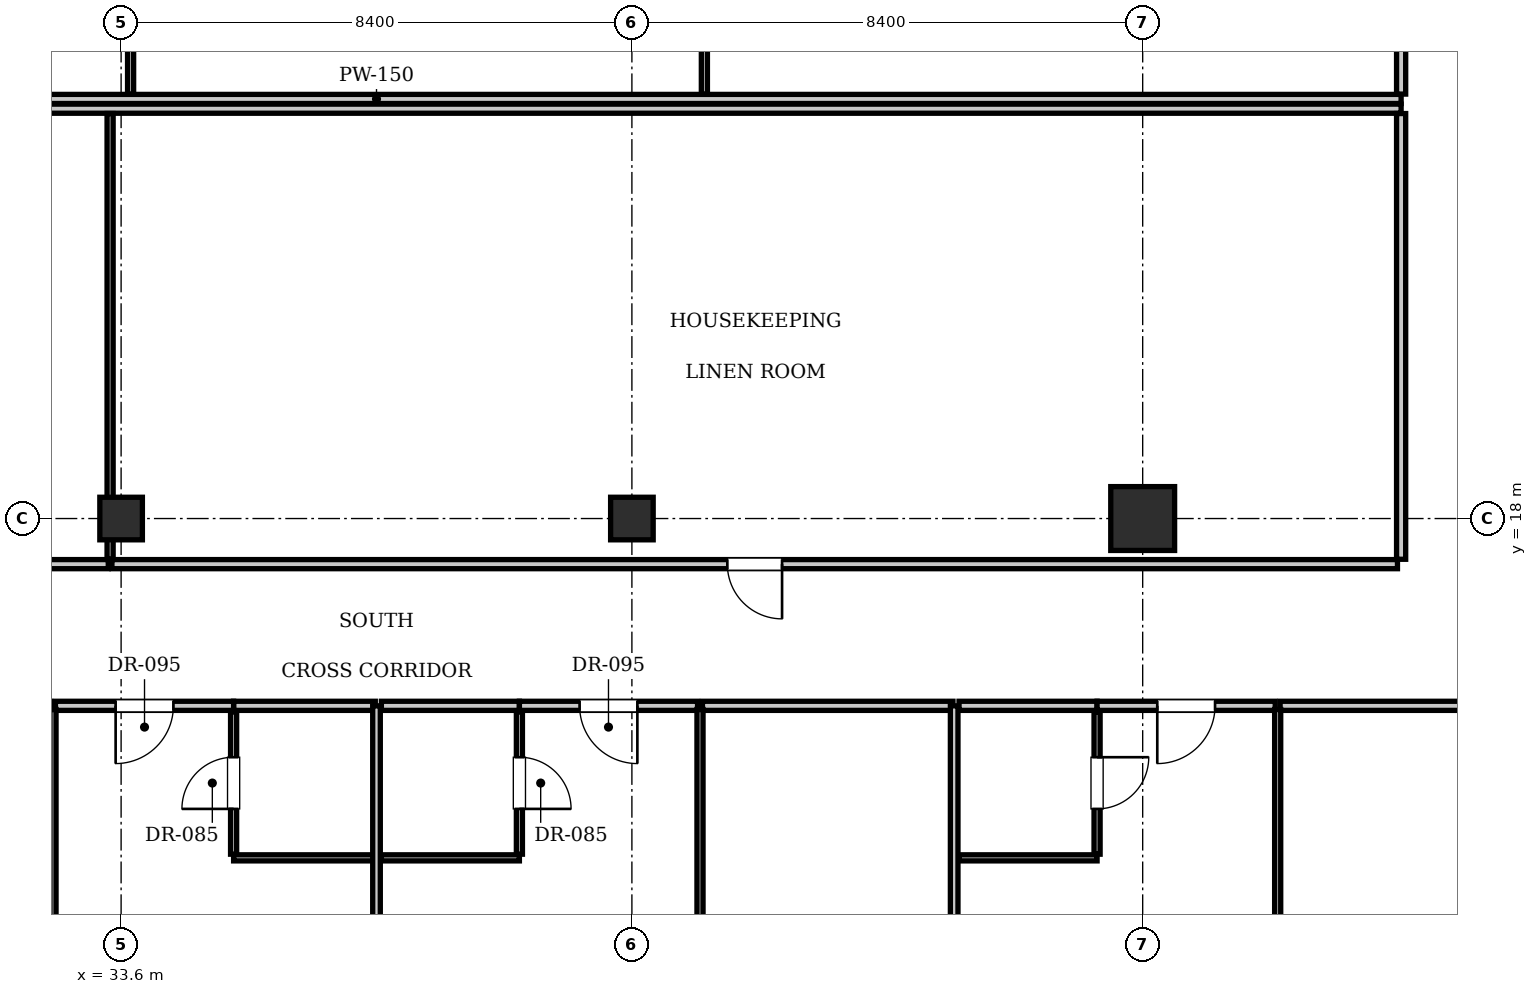
"""IFC4 building model, lengths in metres.
Left out: names, types, materials, properties, quantities, classifications, styles, units other than length and angle.
Written with IfcOpenShell. Run it as: python <this file> out.ifc"""

import sys

from ifc_helpers import new_model, si_unit, direction, frame, frame_2d, origin, origin_2d, place, context, subcontext, project, spatial, rectangle, i_section, extrude, element, fill, save


model = new_model("IFC4")
c1 = context("Model", 3, precision=1e-05, world=origin(), true_north=direction((0.0, 1.0)))
c2 = subcontext(c1, "Body", "Model", "MODEL_VIEW")
j1 = project(units=[si_unit("LENGTHUNIT", "METRE"), si_unit("PLANEANGLEUNIT", "RADIAN")], contexts=[c1])
p1 = place(None, origin())
s1 = spatial("IfcSite", under=j1, at=p1, CompositionType="ELEMENT")
p2 = place(p1, origin())
s2 = spatial("IfcBuilding", under=s1, at=p2, CompositionType="ELEMENT")
p3 = place(p2, frame((0.0, 0.0, 103.95)))
s3 = spatial("IfcBuildingStorey", under=s2, at=p3, CompositionType="ELEMENT", Elevation=103.95)
p4 = place(p3, frame((50.4, 18.0, 0.0), z_axis=(0.0, 0.0, 1.0), x_axis=(1.0, 0.0, 0.0)))
e1 = element("IfcColumn", 1, at=p4, inside=s3, PredefinedType="COLUMN", context=c2, shape_type="SweptSolid", body=[
    extrude(rectangle(XDim=1.05, YDim=1.05, at=origin_2d()), origin(), (0.0, 0.0, 1.0), 3.85),
])
for number, where, z_axis, x_axis in (
    (2, (33.6, 18.0, 0.0), (0.0, 0.0, 1.0), (1.0, 0.0, 0.0)),
    (3, (42.0, 18.0, 0.0), (0.0, 0.0, 1.0), (1.0, 0.0, 0.0)),
):
    element("IfcColumn", number, at=place(p3, frame(where, z_axis=z_axis, x_axis=x_axis)), inside=s3, PredefinedType="COLUMN", context=c2, shape_type="SweptSolid", body=[
        extrude(i_section(OverallWidth=0.7, OverallDepth=0.7, WebThickness=0.028, FlangeThickness=0.044, at=origin_2d()), origin(), (0.0, 0.0, 1.0), 3.85),
    ])
p5 = place(p3, frame((20.95, 24.9, 0.0), z_axis=(0.0, 0.0, 1.0), x_axis=(1.0, 0.0, 0.0)))
e4 = element("IfcWall", 4, at=p5, inside=s3, PredefinedType="PARTITIONING", context=c2, shape_type="SweptSolid", body=[
    extrude(rectangle(XDim=33.7, YDim=0.15, at=frame_2d((16.85, 0.0))), origin(), (0.0, 0.0, 1.0), 3.61),
])
p6 = place(p3, frame((54.65, 24.98, 0.0), z_axis=(0.0, 0.0, 1.0), x_axis=(0.0, 1.0, 0.0)))
e5 = element("IfcWall", 5, at=p6, inside=s3, PredefinedType="PARTITIONING", context=c2, shape_type="SweptSolid", body=[
    extrude(rectangle(XDim=7.34, YDim=0.15, at=frame_2d((3.67, 0.0))), origin(), (0.0, 0.0, 1.0), 3.293),
])
p7 = place(p3, frame((33.756, 24.98, 0.0), z_axis=(0.0, 0.0, 1.0), x_axis=(0.0, 1.0, 0.0)))
e6 = element("IfcWall", 6, at=p7, inside=s3, PredefinedType="PARTITIONING", context=c2, shape_type="SweptSolid", body=[
    extrude(rectangle(XDim=7.34, YDim=0.1, at=frame_2d((3.67, 0.0))), origin(), (0.0, 0.0, 1.0), 2.999),
])
p8 = place(p3, frame((43.192, 24.98, 0.0), z_axis=(0.0, 0.0, 1.0), x_axis=(0.0, 1.0, 0.0)))
e7 = element("IfcWall", 7, at=p8, inside=s3, PredefinedType="PARTITIONING", context=c2, shape_type="SweptSolid", body=[
    extrude(rectangle(XDim=7.34, YDim=0.1, at=frame_2d((3.67, 0.0))), origin(), (0.0, 0.0, 1.0), 3.61),
])
p9 = place(p3, frame((20.95, 24.74, 0.0), z_axis=(0.0, 0.0, 1.0), x_axis=(1.0, 0.0, 0.0)))
e8 = element("IfcWall", 8, at=p9, inside=s3, PredefinedType="PARTITIONING", context=c2, shape_type="SweptSolid", body=[
    extrude(rectangle(XDim=33.7, YDim=0.15, at=frame_2d((16.85, 0.0))), origin(), (0.0, 0.0, 1.0), 3.61),
])
p10 = place(p3, frame((54.65, 17.33, 0.0), z_axis=(0.0, 0.0, 1.0), x_axis=(0.0, 1.0, 0.0)))
e9 = element("IfcWall", 9, at=p10, inside=s3, PredefinedType="PARTITIONING", context=c2, shape_type="SweptSolid", body=[
    extrude(rectangle(XDim=7.33, YDim=0.15, at=frame_2d((3.665, 0.0))), origin(), (0.0, 0.0, 1.0), 3.293),
])
p11 = place(p3, frame((21.01, 17.25, 0.0), z_axis=(0.0, 0.0, 1.0), x_axis=(1.0, 0.0, 0.0)))
e10 = element("IfcWall", 10, at=p11, inside=s3, PredefinedType="PARTITIONING", context=c2, shape_type="SweptSolid", body=[
    extrude(rectangle(XDim=12.379, YDim=0.15, at=frame_2d((6.189, 0.0))), origin(), (0.0, 0.0, 1.0), 3.61),
])
p12 = place(p11, frame((5.74, 0.0, 0.0)))
e11 = element("IfcOpeningElement", 11, at=p12, cuts=e10, PredefinedType="OPENING", context=c2, shape_type="SweptSolid", body=[
    extrude(rectangle(XDim=0.9, YDim=2.1, at=frame_2d((0.45, 1.05))), frame((0.0, 0.085, 0.0), z_axis=(0.0, -1.0, 0.0), x_axis=(1.0, 0.0, 0.0)), (0.0, 0.0, 1.0), 0.17),
])
p13 = place(p3, frame((33.419, 17.33, 0.0), z_axis=(0.0, 0.0, 1.0), x_axis=(0.0, 1.0, 0.0)))
e12 = element("IfcWall", 12, at=p13, inside=s3, PredefinedType="PARTITIONING", context=c2, shape_type="SweptSolid", body=[
    extrude(rectangle(XDim=7.33, YDim=0.1, at=frame_2d((3.665, 0.0))), origin(), (0.0, 0.0, 1.0), 2.999),
])
p14 = place(p3, frame((33.449, 17.25, 0.0), z_axis=(0.0, 0.0, 1.0), x_axis=(1.0, 0.0, 0.0)))
e13 = element("IfcWall", 13, at=p14, inside=s3, PredefinedType="PARTITIONING", context=c2, shape_type="SweptSolid", body=[
    extrude(rectangle(XDim=21.141, YDim=0.15, at=frame_2d((10.571, 0.0))), origin(), (0.0, 0.0, 1.0), 3.61),
])
p15 = place(p14, frame((10.121, 0.0, 0.0)))
e14 = element("IfcOpeningElement", 14, at=p15, cuts=e13, PredefinedType="OPENING", context=c2, shape_type="SweptSolid", body=[
    extrude(rectangle(XDim=0.9, YDim=2.1, at=frame_2d((0.45, 1.05))), frame((0.0, 0.085, 0.0), z_axis=(0.0, -1.0, 0.0), x_axis=(1.0, 0.0, 0.0)), (0.0, 0.0, 1.0), 0.17),
])
p16 = place(p3, frame((35.45, 14.92, 0.0), z_axis=(0.0, 0.0, 1.0), x_axis=(1.0, 0.0, 0.0)))
e15 = element("IfcWall", 15, at=p16, inside=s3, PredefinedType="PARTITIONING", context=c2, shape_type="SweptSolid", body=[
    extrude(rectangle(XDim=2.33, YDim=0.15, at=frame_2d((1.165, 0.0))), origin(), (0.0, 0.0, 1.0), 3.61),
])
p17 = place(p3, frame((35.45, 12.42, 0.0), z_axis=(0.0, 0.0, 1.0), x_axis=(1.0, 0.0, 0.0)))
e16 = element("IfcWall", 16, at=p17, inside=s3, PredefinedType="PARTITIONING", context=c2, shape_type="SweptSolid", body=[
    extrude(rectangle(XDim=2.31, YDim=0.1, at=frame_2d((1.155, 0.0))), origin(), (0.0, 0.0, 1.0), 3.61),
])
p18 = place(p3, frame((35.45, 12.48, 0.0), z_axis=(0.0, 0.0, 1.0), x_axis=(0.0, 1.0, 0.0)))
e17 = element("IfcWall", 17, at=p18, inside=s3, PredefinedType="PARTITIONING", context=c2, shape_type="SweptSolid", body=[
    extrude(rectangle(XDim=2.34, YDim=0.1, at=frame_2d((1.17, 0.0))), origin(), (0.0, 0.0, 1.0), 3.61),
])
p19 = place(p18, frame((0.745, 0.0, 0.0)))
e18 = element("IfcOpeningElement", 18, at=p19, cuts=e17, PredefinedType="OPENING", context=c2, shape_type="SweptSolid", body=[
    extrude(rectangle(XDim=0.85, YDim=2.1, at=frame_2d((0.425, 1.05))), frame((0.0, 0.06, 0.0), z_axis=(0.0, -1.0, 0.0), x_axis=(1.0, 0.0, 0.0)), (0.0, 0.0, 1.0), 0.12),
])
p20 = place(p3, frame((32.52, 14.92, 0.0), z_axis=(0.0, 0.0, 1.0), x_axis=(1.0, 0.0, 0.0)))
e19 = element("IfcWall", 19, at=p20, inside=s3, PredefinedType="PARTITIONING", context=c2, shape_type="SweptSolid", body=[
    extrude(rectangle(XDim=2.93, YDim=0.15, at=frame_2d((1.465, 0.0))), origin(), (0.0, 0.0, 1.0), 3.61),
])
p21 = place(p20, frame((0.99, 0.0, 0.0)))
e20 = element("IfcOpeningElement", 20, at=p21, cuts=e19, PredefinedType="OPENING", context=c2, shape_type="SweptSolid", body=[
    extrude(rectangle(XDim=0.95, YDim=2.15, at=frame_2d((0.475, 1.075))), frame((0.0, 0.085, 0.0), z_axis=(0.0, -1.0, 0.0), x_axis=(1.0, 0.0, 0.0)), (0.0, 0.0, 1.0), 0.17),
])
p22 = place(p3, frame((32.48, 0.03, 0.0), z_axis=(0.0, 0.0, 1.0), x_axis=(0.0, 1.0, 0.0)))
e21 = element("IfcWall", 21, at=p22, inside=s3, PredefinedType="PARTITIONING", context=c2, shape_type="SweptSolid", body=[
    extrude(rectangle(XDim=14.83, YDim=0.1, at=frame_2d((7.415, 0.0))), origin(), (0.0, 0.0, 1.0), 3.61),
])
p23 = place(p22, frame((1.6, 0.0, 0.0)))
e22 = element("IfcOpeningElement", 22, at=p23, cuts=e21, PredefinedType="OPENING", context=c2, shape_type="SweptSolid", body=[
    extrude(rectangle(XDim=0.9, YDim=2.1, at=frame_2d((0.45, 1.05))), frame((0.0, 0.06, 0.0), z_axis=(0.0, -1.0, 0.0), x_axis=(1.0, 0.0, 0.0)), (0.0, 0.0, 1.0), 0.12),
])
p24 = place(p3, frame((37.8, 0.1, 0.0), z_axis=(0.0, 0.0, 1.0), x_axis=(0.0, 1.0, 0.0)))
e23 = element("IfcWall", 23, at=p24, inside=s3, PredefinedType="PARTITIONING", context=c2, shape_type="SweptSolid", body=[
    extrude(rectangle(XDim=14.82, YDim=0.125, at=frame_2d((7.41, 0.0))), origin(), (0.0, 0.0, 1.0), 3.403),
])
p25 = place(p3, frame((37.88, 14.92, 0.0), z_axis=(0.0, 0.0, 1.0), x_axis=(1.0, 0.0, 0.0)))
e24 = element("IfcWall", 24, at=p25, inside=s3, PredefinedType="PARTITIONING", context=c2, shape_type="SweptSolid", body=[
    extrude(rectangle(XDim=2.27, YDim=0.15, at=frame_2d((1.135, 0.0))), origin(), (0.0, 0.0, 1.0), 3.61),
])
p26 = place(p3, frame((37.88, 12.42, 0.0), z_axis=(0.0, 0.0, 1.0), x_axis=(1.0, 0.0, 0.0)))
e25 = element("IfcWall", 25, at=p26, inside=s3, PredefinedType="PARTITIONING", context=c2, shape_type="SweptSolid", body=[
    extrude(rectangle(XDim=2.27, YDim=0.1, at=frame_2d((1.135, 0.0))), origin(), (0.0, 0.0, 1.0), 3.61),
])
p27 = place(p3, frame((40.15, 12.48, 0.0), z_axis=(0.0, 0.0, 1.0), x_axis=(0.0, 1.0, 0.0)))
e26 = element("IfcWall", 26, at=p27, inside=s3, PredefinedType="PARTITIONING", context=c2, shape_type="SweptSolid", body=[
    extrude(rectangle(XDim=2.34, YDim=0.1, at=frame_2d((1.17, 0.0))), origin(), (0.0, 0.0, 1.0), 3.61),
])
p28 = place(p27, frame((0.745, 0.0, 0.0)))
e27 = element("IfcOpeningElement", 27, at=p28, cuts=e26, PredefinedType="OPENING", context=c2, shape_type="SweptSolid", body=[
    extrude(rectangle(XDim=0.85, YDim=2.1, at=frame_2d((0.425, 1.05))), frame((0.0, 0.06, 0.0), z_axis=(0.0, -1.0, 0.0), x_axis=(1.0, 0.0, 0.0)), (0.0, 0.0, 1.0), 0.12),
])
p29 = place(p3, frame((40.15, 14.92, 0.0), z_axis=(0.0, 0.0, 1.0), x_axis=(1.0, 0.0, 0.0)))
e28 = element("IfcWall", 28, at=p29, inside=s3, PredefinedType="PARTITIONING", context=c2, shape_type="SweptSolid", body=[
    extrude(rectangle(XDim=2.93, YDim=0.15, at=frame_2d((1.465, 0.0))), origin(), (0.0, 0.0, 1.0), 3.61),
])
p30 = place(p29, frame((0.99, 0.0, 0.0)))
e29 = element("IfcOpeningElement", 29, at=p30, cuts=e28, PredefinedType="OPENING", context=c2, shape_type="SweptSolid", body=[
    extrude(rectangle(XDim=0.95, YDim=2.15, at=frame_2d((0.475, 1.075))), frame((0.0, 0.085, 0.0), z_axis=(0.0, -1.0, 0.0), x_axis=(1.0, 0.0, 0.0)), (0.0, 0.0, 1.0), 0.17),
])
p31 = place(p3, frame((43.16, 14.92, 0.0), z_axis=(0.0, 0.0, 1.0), x_axis=(1.0, 0.0, 0.0)))
e30 = element("IfcWall", 30, at=p31, inside=s3, PredefinedType="PARTITIONING", context=c2, shape_type="SweptSolid", body=[
    extrude(rectangle(XDim=4.12, YDim=0.15, at=frame_2d((2.06, 0.0))), origin(), (0.0, 0.0, 1.0), 3.61),
])
p32 = place(p3, frame((43.12, 0.03, 0.0), z_axis=(0.0, 0.0, 1.0), x_axis=(0.0, 1.0, 0.0)))
e31 = element("IfcWall", 31, at=p32, inside=s3, PredefinedType="PARTITIONING", context=c2, shape_type="SweptSolid", body=[
    extrude(rectangle(XDim=14.83, YDim=0.1, at=frame_2d((7.415, 0.0))), origin(), (0.0, 0.0, 1.0), 3.61),
])
p33 = place(p32, frame((1.6, 0.0, 0.0)))
e32 = element("IfcOpeningElement", 32, at=p33, cuts=e31, PredefinedType="OPENING", context=c2, shape_type="SweptSolid", body=[
    extrude(rectangle(XDim=0.9, YDim=2.1, at=frame_2d((0.45, 1.05))), frame((0.0, 0.06, 0.0), z_axis=(0.0, -1.0, 0.0), x_axis=(1.0, 0.0, 0.0)), (0.0, 0.0, 1.0), 0.12),
])
p34 = place(p3, frame((47.3, 0.1, 0.0), z_axis=(0.0, 0.0, 1.0), x_axis=(0.0, 1.0, 0.0)))
e33 = element("IfcWall", 33, at=p34, inside=s3, PredefinedType="PARTITIONING", context=c2, shape_type="SweptSolid", body=[
    extrude(rectangle(XDim=14.82, YDim=0.125, at=frame_2d((7.41, 0.0))), origin(), (0.0, 0.0, 1.0), 3.61),
])
p35 = place(p3, frame((47.38, 14.92, 0.0), z_axis=(0.0, 0.0, 1.0), x_axis=(1.0, 0.0, 0.0)))
e34 = element("IfcWall", 34, at=p35, inside=s3, PredefinedType="PARTITIONING", context=c2, shape_type="SweptSolid", body=[
    extrude(rectangle(XDim=2.27, YDim=0.15, at=frame_2d((1.135, 0.0))), origin(), (0.0, 0.0, 1.0), 3.61),
])
p36 = place(p3, frame((47.38, 12.42, 0.0), z_axis=(0.0, 0.0, 1.0), x_axis=(1.0, 0.0, 0.0)))
e35 = element("IfcWall", 35, at=p36, inside=s3, PredefinedType="PARTITIONING", context=c2, shape_type="SweptSolid", body=[
    extrude(rectangle(XDim=2.27, YDim=0.1, at=frame_2d((1.135, 0.0))), origin(), (0.0, 0.0, 1.0), 3.61),
])
p37 = place(p3, frame((49.65, 12.48, 0.0), z_axis=(0.0, 0.0, 1.0), x_axis=(0.0, 1.0, 0.0)))
e36 = element("IfcWall", 36, at=p37, inside=s3, PredefinedType="PARTITIONING", context=c2, shape_type="SweptSolid", body=[
    extrude(rectangle(XDim=2.34, YDim=0.1, at=frame_2d((1.17, 0.0))), origin(), (0.0, 0.0, 1.0), 3.61),
])
p38 = place(p37, frame((0.745, 0.0, 0.0)))
e37 = element("IfcOpeningElement", 37, at=p38, cuts=e36, PredefinedType="OPENING", context=c2, shape_type="SweptSolid", body=[
    extrude(rectangle(XDim=0.85, YDim=2.1, at=frame_2d((0.425, 1.05))), frame((0.0, 0.06, 0.0), z_axis=(0.0, -1.0, 0.0), x_axis=(1.0, 0.0, 0.0)), (0.0, 0.0, 1.0), 0.12),
])
p39 = place(p3, frame((49.65, 14.92, 0.0), z_axis=(0.0, 0.0, 1.0), x_axis=(1.0, 0.0, 0.0)))
e38 = element("IfcWall", 38, at=p39, inside=s3, PredefinedType="PARTITIONING", context=c2, shape_type="SweptSolid", body=[
    extrude(rectangle(XDim=2.93, YDim=0.15, at=frame_2d((1.465, 0.0))), origin(), (0.0, 0.0, 1.0), 3.61),
])
p40 = place(p39, frame((0.99, 0.0, 0.0)))
e39 = element("IfcOpeningElement", 39, at=p40, cuts=e38, PredefinedType="OPENING", context=c2, shape_type="SweptSolid", body=[
    extrude(rectangle(XDim=0.95, YDim=2.15, at=frame_2d((0.475, 1.075))), frame((0.0, 0.085, 0.0), z_axis=(0.0, -1.0, 0.0), x_axis=(1.0, 0.0, 0.0)), (0.0, 0.0, 1.0), 0.17),
])
p41 = place(p3, frame((52.66, 14.92, 0.0), z_axis=(0.0, 0.0, 1.0), x_axis=(1.0, 0.0, 0.0)))
e40 = element("IfcWall", 40, at=p41, inside=s3, PredefinedType="PARTITIONING", context=c2, shape_type="SweptSolid", body=[
    extrude(rectangle(XDim=4.12, YDim=0.15, at=frame_2d((2.06, 0.0))), origin(), (0.0, 0.0, 1.0), 3.61),
])
p42 = place(p3, frame((52.62, 0.03, 0.0), z_axis=(0.0, 0.0, 1.0), x_axis=(0.0, 1.0, 0.0)))
e41 = element("IfcWall", 41, at=p42, inside=s3, PredefinedType="PARTITIONING", context=c2, shape_type="SweptSolid", body=[
    extrude(rectangle(XDim=14.83, YDim=0.1, at=frame_2d((7.415, 0.0))), origin(), (0.0, 0.0, 1.0), 3.61),
])
p43 = place(p42, frame((1.6, 0.0, 0.0)))
e42 = element("IfcOpeningElement", 42, at=p43, cuts=e41, PredefinedType="OPENING", context=c2, shape_type="SweptSolid", body=[
    extrude(rectangle(XDim=0.9, YDim=2.1, at=frame_2d((0.45, 1.05))), frame((0.0, 0.06, 0.0), z_axis=(0.0, -1.0, 0.0), x_axis=(1.0, 0.0, 0.0)), (0.0, 0.0, 1.0), 0.12),
])
p44 = place(p15, frame((0.9, 0.0, 0.0), z_axis=(0.0, 0.0, 1.0), x_axis=(-1.0, 0.0, 0.0)))
e43 = element("IfcDoor", 43, at=p44, inside=s3, OperationType="SINGLE_SWING_LEFT", PredefinedType="DOOR", context=c2, shape_type="SweptSolid", body=[
    extrude(rectangle(XDim=0.9, YDim=2.1, at=frame_2d((0.45, 1.05))), frame((0.0, 0.025, 0.0), z_axis=(0.0, -1.0, 0.0), x_axis=(1.0, 0.0, 0.0)), (0.0, 0.0, 1.0), 0.05),
])
fill(e14, e43)
p45 = place(p19, origin())
e44 = element("IfcDoor", 44, at=p45, inside=s3, OperationType="SINGLE_SWING_LEFT", PredefinedType="DOOR", context=c2, shape_type="SweptSolid", body=[
    extrude(rectangle(XDim=0.85, YDim=2.1, at=frame_2d((0.425, 1.05))), frame((0.0, 0.025, 0.0), z_axis=(0.0, -1.0, 0.0), x_axis=(1.0, 0.0, 0.0)), (0.0, 0.0, 1.0), 0.05),
])
fill(e18, e44)
p46 = place(p21, frame((0.95, 0.0, 0.0), z_axis=(0.0, 0.0, 1.0), x_axis=(-1.0, 0.0, 0.0)))
e45 = element("IfcDoor", 45, at=p46, inside=s3, OperationType="SINGLE_SWING_RIGHT", PredefinedType="DOOR", context=c2, shape_type="SweptSolid", body=[
    extrude(rectangle(XDim=0.95, YDim=2.15, at=frame_2d((0.475, 1.075))), frame((0.0, 0.025, 0.0), z_axis=(0.0, -1.0, 0.0), x_axis=(1.0, 0.0, 0.0)), (0.0, 0.0, 1.0), 0.05),
])
fill(e20, e45)
p47 = place(p28, frame((0.85, 0.0, 0.0), z_axis=(0.0, 0.0, 1.0), x_axis=(-1.0, 0.0, 0.0)))
e46 = element("IfcDoor", 46, at=p47, inside=s3, OperationType="SINGLE_SWING_RIGHT", PredefinedType="DOOR", context=c2, shape_type="SweptSolid", body=[
    extrude(rectangle(XDim=0.85, YDim=2.1, at=frame_2d((0.425, 1.05))), frame((0.0, 0.025, 0.0), z_axis=(0.0, -1.0, 0.0), x_axis=(1.0, 0.0, 0.0)), (0.0, 0.0, 1.0), 0.05),
])
fill(e27, e46)
p48 = place(p30, frame((0.95, 0.0, 0.0), z_axis=(0.0, 0.0, 1.0), x_axis=(-1.0, 0.0, 0.0)))
e47 = element("IfcDoor", 47, at=p48, inside=s3, OperationType="SINGLE_SWING_LEFT", PredefinedType="DOOR", context=c2, shape_type="SweptSolid", body=[
    extrude(rectangle(XDim=0.95, YDim=2.15, at=frame_2d((0.475, 1.075))), frame((0.0, 0.025, 0.0), z_axis=(0.0, -1.0, 0.0), x_axis=(1.0, 0.0, 0.0)), (0.0, 0.0, 1.0), 0.05),
])
fill(e29, e47)
p49 = place(p38, frame((0.85, 0.0, 0.0), z_axis=(0.0, 0.0, 1.0), x_axis=(-1.0, 0.0, 0.0)))
e48 = element("IfcDoor", 48, at=p49, inside=s3, OperationType="SINGLE_SWING_LEFT", PredefinedType="DOOR", context=c2, shape_type="SweptSolid", body=[
    extrude(rectangle(XDim=0.85, YDim=2.1, at=frame_2d((0.425, 1.05))), frame((0.0, 0.025, 0.0), z_axis=(0.0, -1.0, 0.0), x_axis=(1.0, 0.0, 0.0)), (0.0, 0.0, 1.0), 0.05),
])
fill(e37, e48)
p50 = place(p40, frame((0.95, 0.0, 0.0), z_axis=(0.0, 0.0, 1.0), x_axis=(-1.0, 0.0, 0.0)))
e49 = element("IfcDoor", 49, at=p50, inside=s3, OperationType="SINGLE_SWING_RIGHT", PredefinedType="DOOR", context=c2, shape_type="SweptSolid", body=[
    extrude(rectangle(XDim=0.95, YDim=2.15, at=frame_2d((0.475, 1.075))), frame((0.0, 0.025, 0.0), z_axis=(0.0, -1.0, 0.0), x_axis=(1.0, 0.0, 0.0)), (0.0, 0.0, 1.0), 0.05),
])
fill(e39, e49)
save(model, sys.argv[1])
